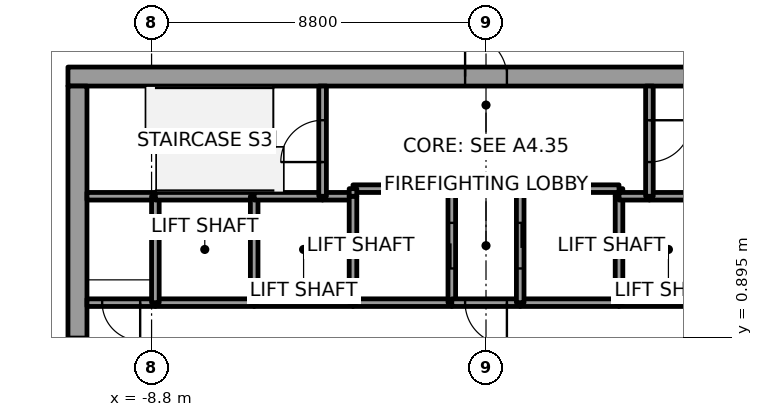
"""IFC4 building model, lengths in metres.
Left out: names, types, materials, properties, quantities, classifications, styles, units other than length and angle.
Written with IfcOpenShell. Run it as: python <this file> out.ifc"""

import sys

from ifc_helpers import new_model, si_unit, direction, frame, frame_2d, origin, place, context, subcontext, project, spatial, rectangle, extrude, element, fill, save


model = new_model("IFC4")
c1 = context("Model", 3, precision=1e-05, world=origin(), true_north=direction((0.0, 1.0)))
c2 = subcontext(c1, "Body", "Model", "MODEL_VIEW")
j1 = project(units=[si_unit("LENGTHUNIT", "METRE"), si_unit("PLANEANGLEUNIT", "RADIAN")], contexts=[c1])
p1 = place(None, origin())
s1 = spatial("IfcSite", under=j1, at=p1, CompositionType="ELEMENT")
p2 = place(p1, origin())
s2 = spatial("IfcBuilding", under=s1, at=p2, CompositionType="ELEMENT")
p3 = place(p2, frame((0.0, 0.0, 153.8)))
s3 = spatial("IfcBuildingStorey", under=s2, at=p3, CompositionType="ELEMENT", Elevation=153.8)
p4 = place(p3, frame((-11.0, 7.75, 0.0), z_axis=(0.0, 0.0, 1.0), x_axis=(1.0, 0.0, 0.0)))
e1 = element("IfcWall", 1, at=p4, inside=s3, PredefinedType="SHEAR", context=c2, shape_type="SweptSolid", body=[
    extrude(rectangle(XDim=22.0, YDim=0.5, at=frame_2d((11.0, 0.0))), origin(), (0.0, 0.0, 1.0), 4.0),
])
p5 = place(p4, frame((10.45, 0.0, 0.0)))
e2 = element("IfcOpeningElement", 2, at=p5, cuts=e1, PredefinedType="OPENING", context=c2, shape_type="SweptSolid", body=[
    extrude(rectangle(XDim=1.1, YDim=2.1, at=frame_2d((0.55, 1.05))), frame((0.0, 0.25, 0.0), z_axis=(0.0, -1.0, 0.0), x_axis=(1.0, 0.0, 0.0)), (0.0, 0.0, 1.0), 0.5),
])
p6 = place(p3, frame((-10.75, -7.5, 0.0), z_axis=(0.0, 0.0, 1.0), x_axis=(0.0, 1.0, 0.0)))
e3 = element("IfcWall", 3, at=p6, inside=s3, PredefinedType="SHEAR", context=c2, shape_type="SweptSolid", body=[
    extrude(rectangle(XDim=15.0, YDim=0.5, at=frame_2d((7.5, 0.0))), origin(), (0.0, 0.0, 1.0), 4.0),
])
p7 = place(p6, frame((6.6, 0.0, 0.0)))
e4 = element("IfcOpeningElement", 4, at=p7, cuts=e3, PredefinedType="OPENING", context=c2, shape_type="SweptSolid", body=[
    extrude(rectangle(XDim=1.8, YDim=2.1, at=frame_2d((0.9, 1.05))), frame((0.0, 0.25, 0.0), z_axis=(0.0, -1.0, 0.0), x_axis=(1.0, 0.0, 0.0)), (0.0, 0.0, 1.0), 0.5),
])
p8 = place(p3, frame((-8.7, 1.8, 0.0), z_axis=(0.0, 0.0, 1.0), x_axis=(-1.0, 0.0, 0.0)))
e5 = element("IfcWall", 5, at=p8, inside=s3, PredefinedType="SOLIDWALL", context=c2, shape_type="SweptSolid", body=[
    extrude(rectangle(XDim=1.8, YDim=0.2, at=frame_2d((0.9, 0.0))), origin(), (0.0, 0.0, 1.0), 3.85),
])
p9 = place(p8, frame((0.4, 0.0, 0.0)))
e6 = element("IfcOpeningElement", 6, at=p9, cuts=e5, PredefinedType="OPENING", context=c2, shape_type="SweptSolid", body=[
    extrude(rectangle(XDim=1.0, YDim=2.1, at=frame_2d((0.5, 1.05))), frame((0.0, 0.1, 0.0), z_axis=(0.0, -1.0, 0.0), x_axis=(1.0, 0.0, 0.0)), (0.0, 0.0, 1.0), 0.2),
])
p10 = place(p3, frame((-8.7, 4.6, 0.0), z_axis=(0.0, 0.0, 1.0), x_axis=(-1.0, 0.0, 0.0)))
e7 = element("IfcWall", 7, at=p10, inside=s3, PredefinedType="SOLIDWALL", context=c2, shape_type="SweptSolid", body=[
    extrude(rectangle(XDim=1.8, YDim=0.2, at=frame_2d((0.9, 0.0))), origin(), (0.0, 0.0, 1.0), 3.85),
])
p11 = place(p3, frame((-6.1, 1.8, 0.0), z_axis=(0.0, 0.0, 1.0), x_axis=(-1.0, 0.0, 0.0)))
e8 = element("IfcWall", 8, at=p11, inside=s3, PredefinedType="SOLIDWALL", context=c2, shape_type="SweptSolid", body=[
    extrude(rectangle(XDim=2.6, YDim=0.2, at=frame_2d((1.3, 0.0))), origin(), (0.0, 0.0, 1.0), 3.85),
])
p12 = place(p3, frame((-8.7, 1.8, 0.0), z_axis=(0.0, 0.0, 1.0), x_axis=(0.0, 1.0, 0.0)))
e9 = element("IfcWall", 9, at=p12, inside=s3, PredefinedType="SOLIDWALL", context=c2, shape_type="SweptSolid", body=[
    extrude(rectangle(XDim=2.8, YDim=0.2, at=frame_2d((1.4, 0.0))), origin(), (0.0, 0.0, 1.0), 3.85),
])
p13 = place(p3, frame((-6.1, 4.6, 0.0), z_axis=(0.0, 0.0, 1.0), x_axis=(-1.0, 0.0, 0.0)))
e10 = element("IfcWall", 10, at=p13, inside=s3, PredefinedType="SOLIDWALL", context=c2, shape_type="SweptSolid", body=[
    extrude(rectangle(XDim=2.6, YDim=0.2, at=frame_2d((1.3, 0.0))), origin(), (0.0, 0.0, 1.0), 3.85),
])
p14 = place(p3, frame((-3.5, 1.8, 0.0), z_axis=(0.0, 0.0, 1.0), x_axis=(-1.0, 0.0, 0.0)))
e11 = element("IfcWall", 11, at=p14, inside=s3, PredefinedType="SOLIDWALL", context=c2, shape_type="SweptSolid", body=[
    extrude(rectangle(XDim=2.6, YDim=0.2, at=frame_2d((1.3, 0.0))), origin(), (0.0, 0.0, 1.0), 3.85),
])
p15 = place(p3, frame((-6.1, 1.8, 0.0), z_axis=(0.0, 0.0, 1.0), x_axis=(0.0, 1.0, 0.0)))
e12 = element("IfcWall", 12, at=p15, inside=s3, PredefinedType="SOLIDWALL", context=c2, shape_type="SweptSolid", body=[
    extrude(rectangle(XDim=2.8, YDim=0.2, at=frame_2d((1.4, 0.0))), origin(), (0.0, 0.0, 1.0), 3.85),
])
p16 = place(p3, frame((-4.3, 4.6, 0.0), z_axis=(0.0, 0.0, 1.0), x_axis=(-1.0, 0.0, 0.0)))
e13 = element("IfcWall", 13, at=p16, inside=s3, PredefinedType="SOLIDWALL", context=c2, shape_type="SweptSolid", body=[
    extrude(rectangle(XDim=1.8, YDim=0.2, at=frame_2d((0.9, 0.0))), origin(), (0.0, 0.0, 1.0), 3.85),
])
p17 = place(p3, frame((-3.5, 4.6, 0.0), z_axis=(0.0, 0.0, 1.0), x_axis=(-1.0, 0.0, 0.0)))
e14 = element("IfcWall", 14, at=p17, inside=s3, PredefinedType="SOLIDWALL", context=c2, shape_type="SweptSolid", body=[
    extrude(rectangle(XDim=0.8, YDim=0.2, at=frame_2d((0.4, 0.0))), origin(), (0.0, 0.0, 1.0), 3.85),
])
p18 = place(p3, frame((-4.3, 4.6, 0.0), z_axis=(0.0, 0.0, 1.0), x_axis=(0.0, 1.0, 0.0)))
e15 = element("IfcWall", 15, at=p18, inside=s3, PredefinedType="SOLIDWALL", context=c2, shape_type="SweptSolid", body=[
    extrude(rectangle(XDim=2.9, YDim=0.2, at=frame_2d((1.45, 0.0))), origin(), (0.0, 0.0, 1.0), 3.85),
])
p19 = place(p18, frame((0.9, 0.0, 0.0)))
e16 = element("IfcOpeningElement", 16, at=p19, cuts=e15, PredefinedType="OPENING", context=c2, shape_type="SweptSolid", body=[
    extrude(rectangle(XDim=1.1, YDim=2.1, at=frame_2d((0.55, 1.05))), frame((0.0, 0.1, 0.0), z_axis=(0.0, -1.0, 0.0), x_axis=(1.0, 0.0, 0.0)), (0.0, 0.0, 1.0), 0.2),
])
p20 = place(p3, frame((-0.9, 1.8, 0.0), z_axis=(0.0, 0.0, 1.0), x_axis=(-1.0, 0.0, 0.0)))
e17 = element("IfcWall", 17, at=p20, inside=s3, PredefinedType="SOLIDWALL", context=c2, shape_type="SweptSolid", body=[
    extrude(rectangle(XDim=2.6, YDim=0.2, at=frame_2d((1.3, 0.0))), origin(), (0.0, 0.0, 1.0), 3.85),
])
p21 = place(p3, frame((-3.5, 4.6, 0.0), z_axis=(0.0, 0.0, 1.0), x_axis=(0.0, -1.0, 0.0)))
e18 = element("IfcWall", 18, at=p21, inside=s3, PredefinedType="SOLIDWALL", context=c2, shape_type="SweptSolid", body=[
    extrude(rectangle(XDim=2.8, YDim=0.2, at=frame_2d((1.4, 0.0))), origin(), (0.0, 0.0, 1.0), 3.85),
])
p22 = place(p3, frame((-0.9, 1.8, 0.0), z_axis=(0.0, 0.0, 1.0), x_axis=(0.0, 1.0, 0.0)))
e19 = element("IfcWall", 19, at=p22, inside=s3, PredefinedType="SOLIDWALL", context=c2, shape_type="SweptSolid", body=[
    extrude(rectangle(XDim=3.0, YDim=0.2, at=frame_2d((1.5, 0.0))), origin(), (0.0, 0.0, 1.0), 3.85),
])
p23 = place(p22, frame((0.9, 0.0, 0.0)))
e20 = element("IfcOpeningElement", 20, at=p23, cuts=e19, PredefinedType="OPENING", context=c2, shape_type="SweptSolid", body=[
    extrude(rectangle(XDim=1.2, YDim=2.1, at=frame_2d((0.6, 1.05))), frame((0.0, 0.1, 0.0), z_axis=(0.0, -1.0, 0.0), x_axis=(1.0, 0.0, 0.0)), (0.0, 0.0, 1.0), 0.2),
])
p24 = place(p3, frame((-0.9, 4.8, 0.0), z_axis=(0.0, 0.0, 1.0), x_axis=(-1.0, 0.0, 0.0)))
e21 = element("IfcWall", 21, at=p24, inside=s3, PredefinedType="SOLIDWALL", context=c2, shape_type="SweptSolid", body=[
    extrude(rectangle(XDim=2.6, YDim=0.2, at=frame_2d((1.3, 0.0))), origin(), (0.0, 0.0, 1.0), 3.85),
])
p25 = place(p3, frame((-3.5, 4.8, 0.0), z_axis=(0.0, 0.0, 1.0), x_axis=(0.0, -1.0, 0.0)))
e22 = element("IfcWall", 22, at=p25, inside=s3, PredefinedType="SOLIDWALL", context=c2, shape_type="SweptSolid", body=[
    extrude(rectangle(XDim=0.2, YDim=0.2, at=frame_2d((0.1, 0.0))), origin(), (0.0, 0.0, 1.0), 3.85),
])
p26 = place(p3, frame((0.9, 1.8, 0.0), z_axis=(0.0, 0.0, 1.0), x_axis=(-1.0, 0.0, 0.0)))
e23 = element("IfcWall", 23, at=p26, inside=s3, PredefinedType="SOLIDWALL", context=c2, shape_type="SweptSolid", body=[
    extrude(rectangle(XDim=1.8, YDim=0.2, at=frame_2d((0.9, 0.0))), origin(), (0.0, 0.0, 1.0), 3.85),
])
p27 = place(p26, frame((0.35, 0.0, 0.0)))
e24 = element("IfcOpeningElement", 24, at=p27, cuts=e23, PredefinedType="OPENING", context=c2, shape_type="SweptSolid", body=[
    extrude(rectangle(XDim=1.1, YDim=2.1, at=frame_2d((0.55, 1.05))), frame((0.0, 0.1, 0.0), z_axis=(0.0, -1.0, 0.0), x_axis=(1.0, 0.0, 0.0)), (0.0, 0.0, 1.0), 0.2),
])
p28 = place(p3, frame((3.5, 1.8, 0.0), z_axis=(0.0, 0.0, 1.0), x_axis=(-1.0, 0.0, 0.0)))
e25 = element("IfcWall", 25, at=p28, inside=s3, PredefinedType="SOLIDWALL", context=c2, shape_type="SweptSolid", body=[
    extrude(rectangle(XDim=2.6, YDim=0.2, at=frame_2d((1.3, 0.0))), origin(), (0.0, 0.0, 1.0), 3.85),
])
p29 = place(p3, frame((3.5, 4.6, 0.0), z_axis=(0.0, 0.0, 1.0), x_axis=(0.0, 1.0, 0.0)))
e26 = element("IfcWall", 26, at=p29, inside=s3, PredefinedType="SOLIDWALL", context=c2, shape_type="SweptSolid", body=[
    extrude(rectangle(XDim=0.2, YDim=0.2, at=frame_2d((0.1, 0.0))), origin(), (0.0, 0.0, 1.0), 3.85),
])
p30 = place(p3, frame((3.5, 4.8, 0.0), z_axis=(0.0, 0.0, 1.0), x_axis=(-1.0, 0.0, 0.0)))
e27 = element("IfcWall", 27, at=p30, inside=s3, PredefinedType="SOLIDWALL", context=c2, shape_type="SweptSolid", body=[
    extrude(rectangle(XDim=2.6, YDim=0.2, at=frame_2d((1.3, 0.0))), origin(), (0.0, 0.0, 1.0), 3.85),
])
p31 = place(p3, frame((0.9, 4.8, 0.0), z_axis=(0.0, 0.0, 1.0), x_axis=(0.0, -1.0, 0.0)))
e28 = element("IfcWall", 28, at=p31, inside=s3, PredefinedType="SOLIDWALL", context=c2, shape_type="SweptSolid", body=[
    extrude(rectangle(XDim=3.0, YDim=0.2, at=frame_2d((1.5, 0.0))), origin(), (0.0, 0.0, 1.0), 3.85),
])
p32 = place(p31, frame((0.9, 0.0, 0.0)))
e29 = element("IfcOpeningElement", 29, at=p32, cuts=e28, PredefinedType="OPENING", context=c2, shape_type="SweptSolid", body=[
    extrude(rectangle(XDim=1.2, YDim=2.1, at=frame_2d((0.6, 1.05))), frame((0.0, 0.1, 0.0), z_axis=(0.0, -1.0, 0.0), x_axis=(1.0, 0.0, 0.0)), (0.0, 0.0, 1.0), 0.2),
])
p33 = place(p3, frame((6.1, 1.8, 0.0), z_axis=(0.0, 0.0, 1.0), x_axis=(-1.0, 0.0, 0.0)))
e30 = element("IfcWall", 30, at=p33, inside=s3, PredefinedType="SOLIDWALL", context=c2, shape_type="SweptSolid", body=[
    extrude(rectangle(XDim=2.6, YDim=0.2, at=frame_2d((1.3, 0.0))), origin(), (0.0, 0.0, 1.0), 3.85),
])
p34 = place(p3, frame((3.5, 1.8, 0.0), z_axis=(0.0, 0.0, 1.0), x_axis=(0.0, 1.0, 0.0)))
e31 = element("IfcWall", 31, at=p34, inside=s3, PredefinedType="SOLIDWALL", context=c2, shape_type="SweptSolid", body=[
    extrude(rectangle(XDim=2.8, YDim=0.2, at=frame_2d((1.4, 0.0))), origin(), (0.0, 0.0, 1.0), 3.85),
])
p35 = place(p3, frame((4.3, 4.6, 0.0), z_axis=(0.0, 0.0, 1.0), x_axis=(-1.0, 0.0, 0.0)))
e32 = element("IfcWall", 32, at=p35, inside=s3, PredefinedType="SOLIDWALL", context=c2, shape_type="SweptSolid", body=[
    extrude(rectangle(XDim=0.8, YDim=0.2, at=frame_2d((0.4, 0.0))), origin(), (0.0, 0.0, 1.0), 3.85),
])
p36 = place(p3, frame((6.1, 4.6, 0.0), z_axis=(0.0, 0.0, 1.0), x_axis=(-1.0, 0.0, 0.0)))
e33 = element("IfcWall", 33, at=p36, inside=s3, PredefinedType="SOLIDWALL", context=c2, shape_type="SweptSolid", body=[
    extrude(rectangle(XDim=1.8, YDim=0.2, at=frame_2d((0.9, 0.0))), origin(), (0.0, 0.0, 1.0), 3.85),
])
p37 = place(p3, frame((4.3, 7.5, 0.0), z_axis=(0.0, 0.0, 1.0), x_axis=(0.0, -1.0, 0.0)))
e34 = element("IfcWall", 34, at=p37, inside=s3, PredefinedType="SOLIDWALL", context=c2, shape_type="SweptSolid", body=[
    extrude(rectangle(XDim=2.9, YDim=0.2, at=frame_2d((1.45, 0.0))), origin(), (0.0, 0.0, 1.0), 3.85),
])
p38 = place(p37, frame((0.9, 0.0, 0.0)))
e35 = element("IfcOpeningElement", 35, at=p38, cuts=e34, PredefinedType="OPENING", context=c2, shape_type="SweptSolid", body=[
    extrude(rectangle(XDim=1.1, YDim=2.1, at=frame_2d((0.55, 1.05))), frame((0.0, 0.1, 0.0), z_axis=(0.0, -1.0, 0.0), x_axis=(1.0, 0.0, 0.0)), (0.0, 0.0, 1.0), 0.2),
])
p39 = place(p23, origin())
e36 = element("IfcDoor", 36, at=p39, inside=s3, OperationType="SLIDING_TO_RIGHT", PredefinedType="DOOR", context=c2, shape_type="SweptSolid", body=[
    extrude(rectangle(XDim=1.2, YDim=2.1, at=frame_2d((0.6, 1.05))), frame((0.0, 0.025, 0.0), z_axis=(0.0, -1.0, 0.0), x_axis=(1.0, 0.0, 0.0)), (0.0, 0.0, 1.0), 0.05),
])
fill(e20, e36)
p40 = place(p32, origin())
e37 = element("IfcDoor", 37, at=p40, inside=s3, OperationType="SLIDING_TO_LEFT", PredefinedType="DOOR", context=c2, shape_type="SweptSolid", body=[
    extrude(rectangle(XDim=1.2, YDim=2.1, at=frame_2d((0.6, 1.05))), frame((0.0, 0.025, 0.0), z_axis=(0.0, -1.0, 0.0), x_axis=(1.0, 0.0, 0.0)), (0.0, 0.0, 1.0), 0.05),
])
fill(e29, e37)
p41 = place(p27, origin())
e38 = element("IfcDoor", 38, at=p41, inside=s3, OperationType="SINGLE_SWING_LEFT", PredefinedType="DOOR", context=c2, shape_type="SweptSolid", body=[
    extrude(rectangle(XDim=1.1, YDim=2.1, at=frame_2d((0.55, 1.05))), frame((0.0, 0.025, 0.0), z_axis=(0.0, -1.0, 0.0), x_axis=(1.0, 0.0, 0.0)), (0.0, 0.0, 1.0), 0.05),
])
fill(e24, e38)
p42 = place(p9, origin())
e39 = element("IfcDoor", 39, at=p42, inside=s3, OperationType="SINGLE_SWING_LEFT", PredefinedType="DOOR", context=c2, shape_type="SweptSolid", body=[
    extrude(rectangle(XDim=1.0, YDim=2.1, at=frame_2d((0.5, 1.05))), frame((0.0, 0.025, 0.0), z_axis=(0.0, -1.0, 0.0), x_axis=(1.0, 0.0, 0.0)), (0.0, 0.0, 1.0), 0.05),
])
fill(e6, e39)
p43 = place(p19, origin())
e40 = element("IfcDoor", 40, at=p43, inside=s3, OperationType="SINGLE_SWING_LEFT", PredefinedType="DOOR", context=c2, shape_type="SweptSolid", body=[
    extrude(rectangle(XDim=1.1, YDim=2.1, at=frame_2d((0.55, 1.05))), frame((0.0, 0.025, 0.0), z_axis=(0.0, -1.0, 0.0), x_axis=(1.0, 0.0, 0.0)), (0.0, 0.0, 1.0), 0.05),
])
fill(e16, e40)
p44 = place(p38, origin())
e41 = element("IfcDoor", 41, at=p44, inside=s3, OperationType="SINGLE_SWING_RIGHT", PredefinedType="DOOR", context=c2, shape_type="SweptSolid", body=[
    extrude(rectangle(XDim=1.1, YDim=2.1, at=frame_2d((0.55, 1.05))), frame((0.0, 0.025, 0.0), z_axis=(0.0, -1.0, 0.0), x_axis=(1.0, 0.0, 0.0)), (0.0, 0.0, 1.0), 0.05),
])
fill(e35, e41)
p45 = place(p7, origin())
e42 = element("IfcDoor", 42, at=p45, inside=s3, OperationType="DOUBLE_DOOR_SINGLE_SWING", PredefinedType="DOOR", context=c2, shape_type="SweptSolid", body=[
    extrude(rectangle(XDim=1.8, YDim=2.1, at=frame_2d((0.9, 1.05))), frame((0.0, 0.025, 0.0), z_axis=(0.0, -1.0, 0.0), x_axis=(1.0, 0.0, 0.0)), (0.0, 0.0, 1.0), 0.05),
])
fill(e4, e42)
p46 = place(p5, origin())
e43 = element("IfcDoor", 43, at=p46, inside=s3, OperationType="SINGLE_SWING_RIGHT", PredefinedType="DOOR", context=c2, shape_type="SweptSolid", body=[
    extrude(rectangle(XDim=1.1, YDim=2.1, at=frame_2d((0.55, 1.05))), frame((0.0, 0.025, 0.0), z_axis=(0.0, -1.0, 0.0), x_axis=(1.0, 0.0, 0.0)), (0.0, 0.0, 1.0), 0.05),
])
fill(e2, e43)
save(model, sys.argv[1])
